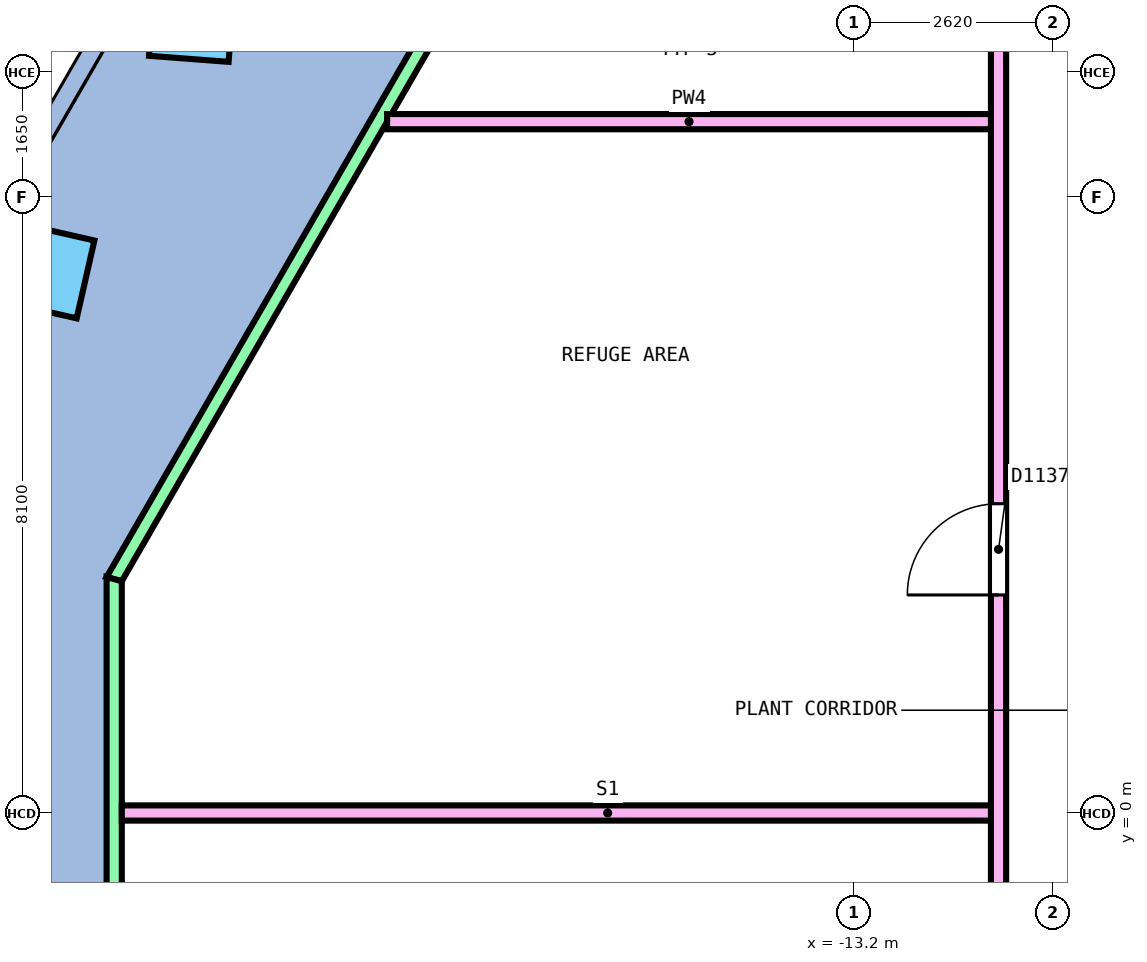
"""IFC4 building model, lengths in metres.
Left out: names, types, materials, properties, quantities, classifications, styles, units other than length and angle.
Written with IfcOpenShell. Run it as: python <this file> out.ifc"""

import sys

from ifc_helpers import new_model, si_unit, direction, frame, frame_2d, origin, origin_2d, place, context, subcontext, project, spatial, polyline, rectangle, outline, extrude, element, fill, save


model = new_model("IFC4")
c1 = context("Model", 3, precision=1e-05, world=origin(), true_north=direction((0.0, 1.0)))
c2 = subcontext(c1, "Body", "Model", "MODEL_VIEW")
j1 = project(units=[si_unit("LENGTHUNIT", "METRE"), si_unit("PLANEANGLEUNIT", "RADIAN")], contexts=[c1])
p1 = place(None, origin())
s1 = spatial("IfcSite", under=j1, at=p1, CompositionType="ELEMENT")
p2 = place(p1, origin())
s2 = spatial("IfcBuilding", under=s1, at=p2, CompositionType="ELEMENT")
p3 = place(p2, frame((0.0, 0.0, 257.4)))
s3 = spatial("IfcBuildingStorey", under=s2, at=p3, CompositionType="ELEMENT", Elevation=257.4)
p4 = place(p3, frame((-21.913, 10.445, 0.0), z_axis=(0.338010557534, -0.159800951388, 0.927476425), x_axis=(-0.489874793879, -0.871329979204, 0.028403409338)))
e1 = element("IfcColumn", 1, at=p4, inside=s3, PredefinedType="COLUMN", context=c2, shape_type="SweptSolid", body=[
    extrude(rectangle(XDim=1.05, YDim=1.05, at=origin_2d()), origin(), (0.0, 0.0, 1.0), 5.65),
])
p5 = place(p3, frame((-23.824, 7.136, 0.0), z_axis=(0.367233587449, -0.106381499952, 0.924025145068), x_axis=(-0.468357248009, -0.879451778077, 0.084888504957)))
e2 = element("IfcColumn", 2, at=p5, inside=s3, PredefinedType="COLUMN", context=c2, shape_type="SweptSolid", body=[
    extrude(rectangle(XDim=1.05, YDim=1.05, at=origin_2d()), origin(), (0.0, 0.0, 1.0), 5.671),
])
p6 = place(p3, frame((-25.734, 3.827, 0.0), z_axis=(0.394826526735, -0.05316205209, 0.917216337624), x_axis=(-0.02097756087, -0.998585897225, -0.048848211866)))
e3 = element("IfcColumn", 3, at=p6, inside=s3, PredefinedType="COLUMN", context=c2, shape_type="SweptSolid", body=[
    extrude(rectangle(XDim=1.05, YDim=1.05, at=origin_2d()), origin(), (0.0, 0.0, 1.0), 5.713),
])
p7 = place(p3, frame((-25.734, 0.0, 0.0), z_axis=(0.395385642257, 0.0, 0.918515211576), x_axis=(0.0, -1.0, 0.0)))
e4 = element("IfcColumn", 4, at=p7, inside=s3, PredefinedType="COLUMN", context=c2, shape_type="SweptSolid", body=[
    extrude(rectangle(XDim=1.05, YDim=1.05, at=origin_2d()), origin(), (0.0, 0.0, 1.0), 5.705),
])
p8 = place(p3, frame((-14.132, 18.323, 0.0), z_axis=(0.0, 0.0, 1.0), x_axis=(-0.499992938033, -0.866029480975, 0.0)))
e5 = element("IfcWall", 5, at=p8, inside=s3, PredefinedType="SOLIDWALL", context=c2, shape_type="SweptSolid", body=[
    extrude(outline(polyline([(-0.027, -0.1), (17.633, -0.1), (17.579, 0.1), (0.027, 0.1), (-0.027, -0.1)])), origin(), (0.0, 0.0, 1.0), 3.95),
])
p9 = place(p3, frame((-22.934, 3.076, 0.0), z_axis=(0.0, 0.0, 1.0), x_axis=(0.0, -1.0, 0.0)))
e6 = element("IfcWall", 6, at=p9, inside=s3, PredefinedType="SOLIDWALL", context=c2, shape_type="SweptSolid", body=[
    extrude(outline(polyline([(-0.027, -0.1), (6.18, -0.1), (6.126, 0.1), (0.027, 0.1), (-0.027, -0.1)])), origin(), (0.0, 0.0, 1.0), 3.95),
])
p10 = place(p3, frame((-11.3, -5.686, 0.0), z_axis=(0.0, 0.0, 1.0), x_axis=(0.0, 1.0, 0.0)))
e7 = element("IfcWall", 7, at=p10, inside=s3, PredefinedType="PARTITIONING", context=c2, shape_type="SweptSolid", body=[
    extrude(rectangle(XDim=15.986, YDim=0.2, at=frame_2d((7.993, 0.0))), origin(), (0.0, 0.0, 1.0), 4.5),
])
p11 = place(p10, frame((8.554, 0.0, 0.0)))
e8 = element("IfcOpeningElement", 8, at=p11, cuts=e7, PredefinedType="OPENING", context=c2, shape_type="SweptSolid", body=[
    extrude(rectangle(XDim=1.2, YDim=2.1, at=frame_2d((0.6, 1.05))), frame((0.0, 0.11, 0.0), z_axis=(0.0, -1.0, 0.0), x_axis=(1.0, 0.0, 0.0)), (0.0, 0.0, 1.0), 0.22),
])
p12 = place(p10, frame((3.165, 0.0, 0.0)))
e9 = element("IfcOpeningElement", 9, at=p12, cuts=e7, PredefinedType="OPENING", context=c2, shape_type="SweptSolid", body=[
    extrude(rectangle(XDim=1.2, YDim=2.1, at=frame_2d((0.6, 1.05))), frame((0.0, 0.11, 0.0), z_axis=(0.0, -1.0, 0.0), x_axis=(1.0, 0.0, 0.0)), (0.0, 0.0, 1.0), 0.22),
])
p13 = place(p3, frame((-19.344, 9.095, 0.0), z_axis=(0.0, 0.0, 1.0), x_axis=(1.0, 0.0, 0.0)))
e10 = element("IfcWall", 10, at=p13, inside=s3, PredefinedType="PARTITIONING", context=c2, shape_type="SweptSolid", body=[
    extrude(rectangle(XDim=7.944, YDim=0.2, at=frame_2d((3.972, 0.0))), origin(), (0.0, 0.0, 1.0), 4.5),
])
p14 = place(p3, frame((-22.834, 0.0, 0.0), z_axis=(0.0, 0.0, 1.0), x_axis=(1.0, 0.0, 0.0)))
e11 = element("IfcWall", 11, at=p14, inside=s3, PredefinedType="PARTITIONING", context=c2, shape_type="SweptSolid", body=[
    extrude(rectangle(XDim=11.435, YDim=0.2, at=frame_2d((5.717, 0.0))), origin(), (0.0, 0.0, 1.0), 4.5),
])
p15 = place(p11, origin())
e12 = element("IfcDoor", 12, at=p15, inside=s3, OperationType="DOUBLE_DOOR_SINGLE_SWING", PredefinedType="DOOR", context=c2, shape_type="SweptSolid", body=[
    extrude(rectangle(XDim=1.2, YDim=2.1, at=frame_2d((0.6, 1.05))), frame((0.0, 0.025, 0.0), z_axis=(0.0, -1.0, 0.0), x_axis=(1.0, 0.0, 0.0)), (0.0, 0.0, 1.0), 0.05),
])
fill(e8, e12)
save(model, sys.argv[1])
